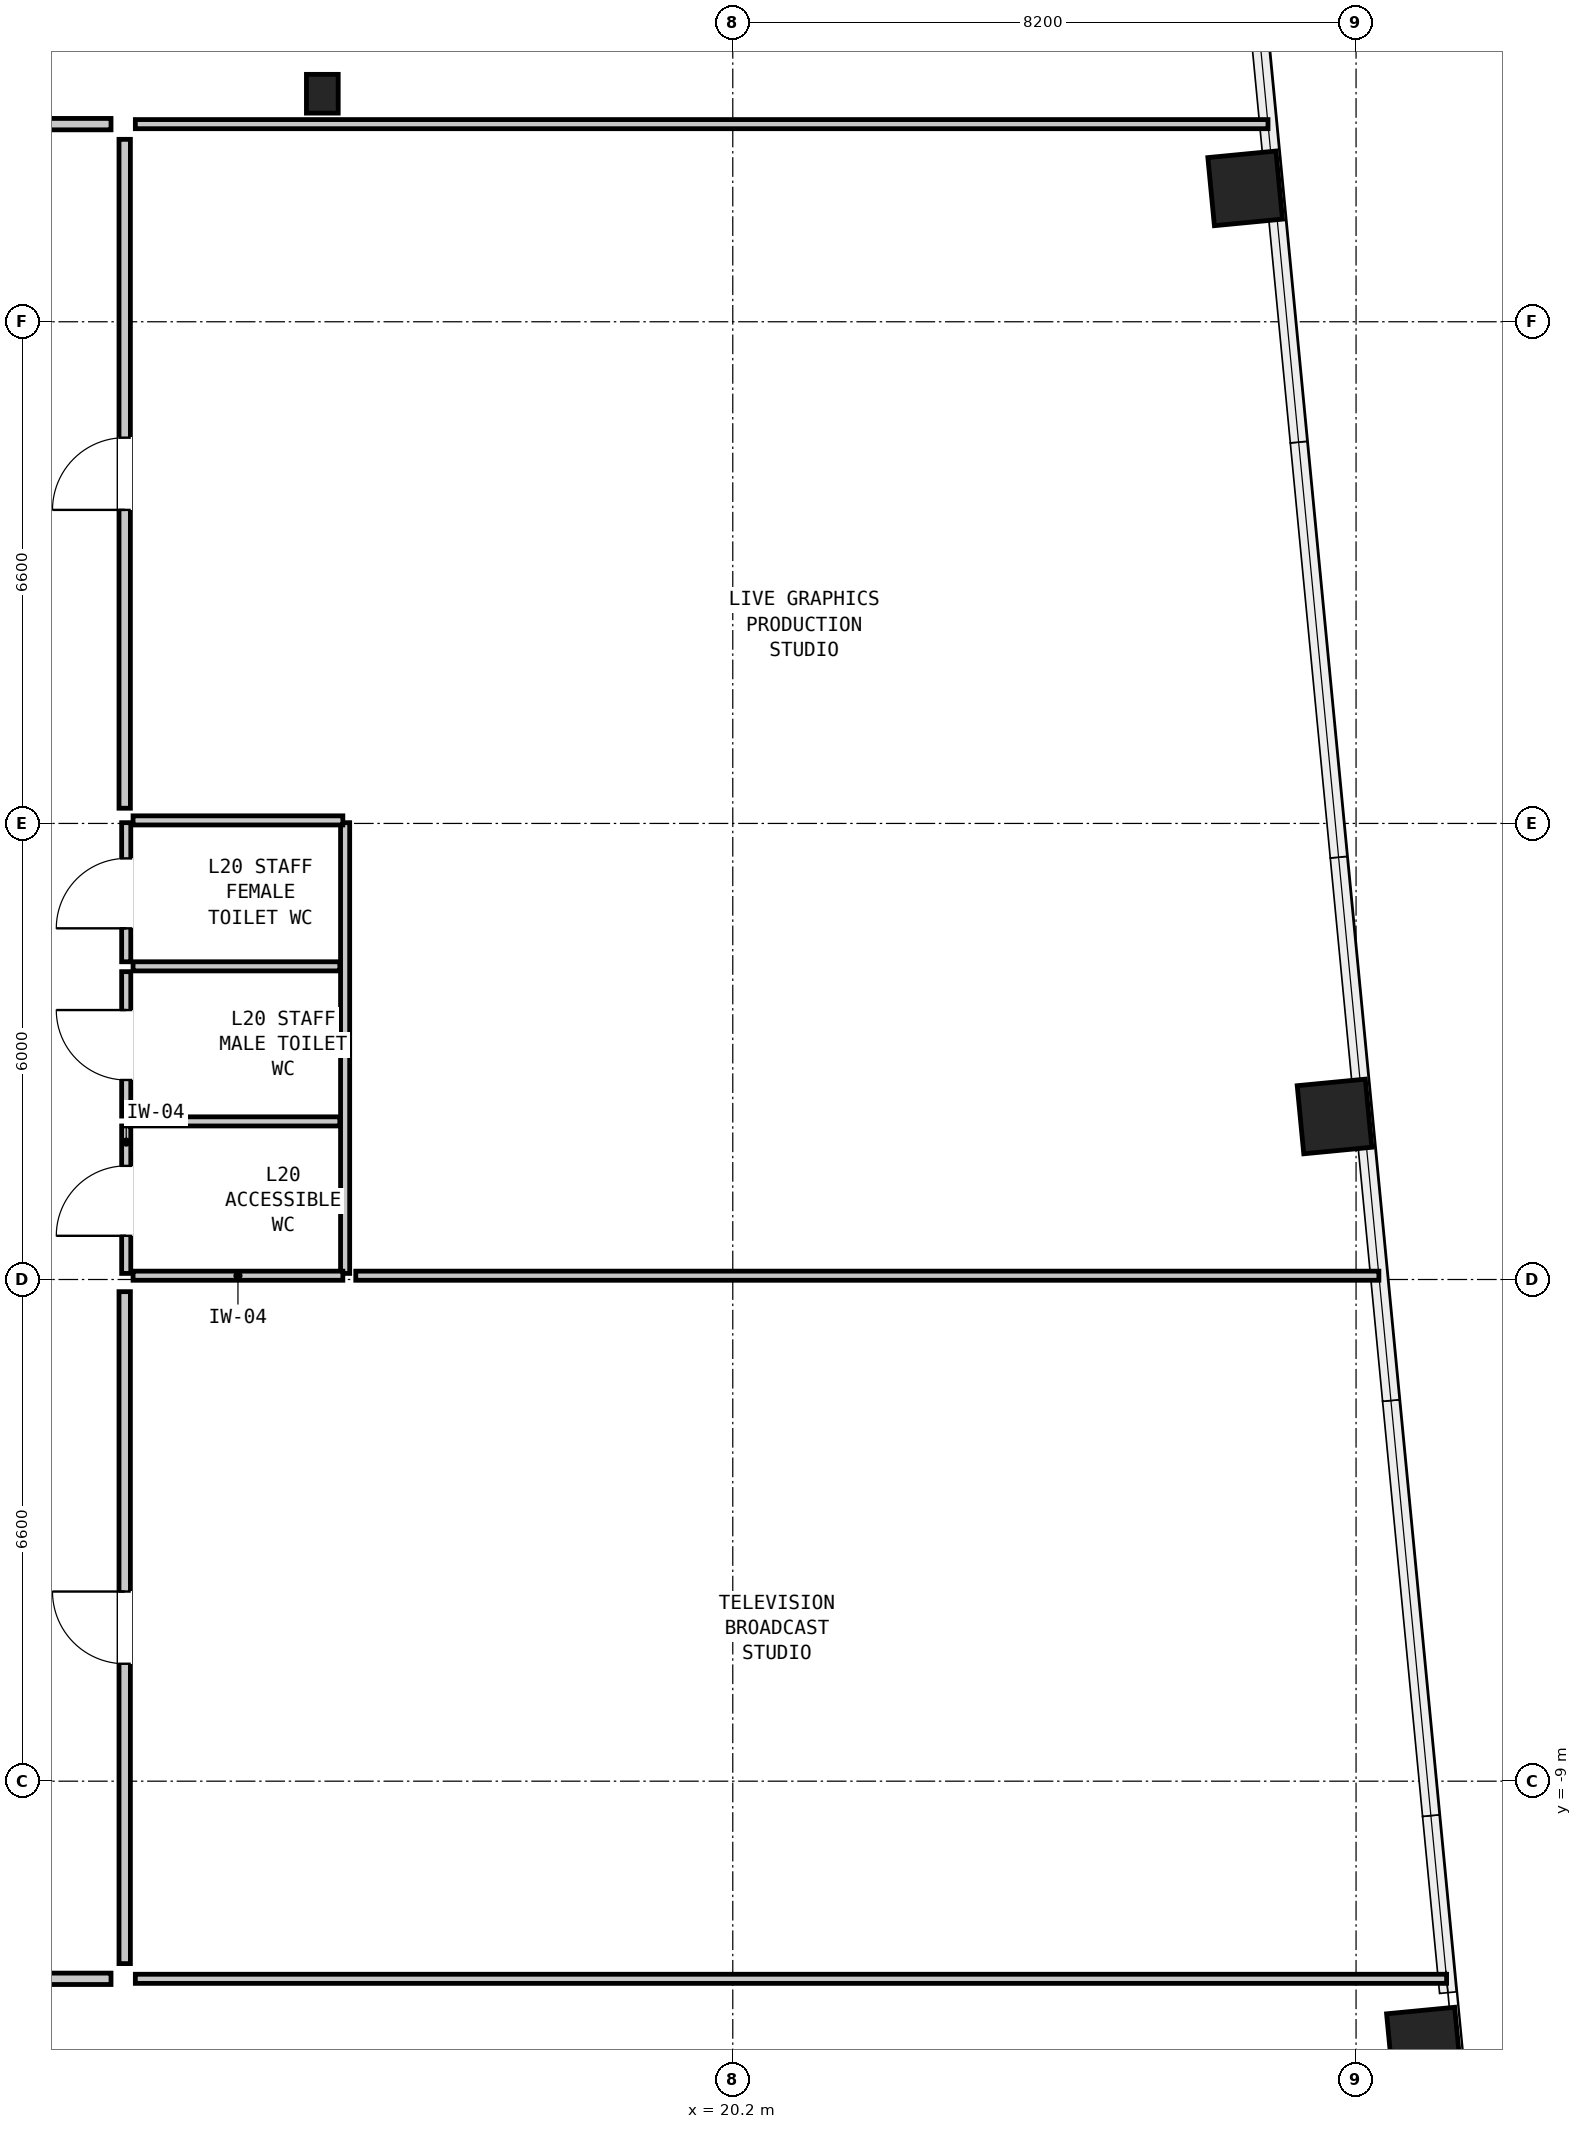
"""IFC4 building model, lengths in metres.
Left out: names, types, materials, properties, quantities, classifications, styles, units other than length and angle.
Written with IfcOpenShell. Run it as: python <this file> out.ifc"""

import sys

from ifc_helpers import new_model, si_unit, direction, frame, frame_2d, origin, origin_2d, place, context, subcontext, project, spatial, rectangle, hollow_rectangle, i_section, extrude, element, fill, save


model = new_model("IFC4")
c1 = context("Model", 3, precision=1e-05, world=origin(), true_north=direction((0.0, 1.0)))
c2 = subcontext(c1, "Body", "Model", "MODEL_VIEW")
j1 = project(units=[si_unit("LENGTHUNIT", "METRE"), si_unit("PLANEANGLEUNIT", "RADIAN")], contexts=[c1])
p1 = place(None, origin())
s1 = spatial("IfcSite", under=j1, at=p1, CompositionType="ELEMENT")
p2 = place(p1, origin())
s2 = spatial("IfcBuilding", under=s1, at=p2, CompositionType="ELEMENT")
p3 = place(p2, frame((0.0, 0.0, 72.5)))
s3 = spatial("IfcBuildingStorey", under=s2, at=p3, CompositionType="ELEMENT", Elevation=72.5)
for number, where, z_axis, x_axis in (
    (1, (29.292, -12.465, 0.0), (0.0, 0.0, 1.0), (-0.096, 0.995, 0.0)),
    (2, (28.117, -0.255, 0.0), (0.0, 0.0, 1.0), (-0.096, 0.995, 0.0)),
    (3, (26.941, 11.955, 0.0), (0.0, 0.0, 1.0), (-0.096, 0.995, 0.0)),
):
    element("IfcColumn", number, at=place(p3, frame(where, z_axis=z_axis, x_axis=x_axis)), inside=s3, PredefinedType="COLUMN", context=c2, shape_type="SweptSolid", body=[
        extrude(hollow_rectangle(XDim=0.9, YDim=0.9, WallThickness=0.055, at=origin_2d()), origin(), (0.0, 0.0, 1.0), 3.05),
    ])
p4 = place(p3, frame((14.8, 13.2, 0.0), z_axis=(0.0, 0.0, 1.0), x_axis=(1.0, 0.0, 0.0)))
e4 = element("IfcColumn", 4, at=p4, inside=s3, PredefinedType="COLUMN", context=c2, shape_type="SweptSolid", body=[
    extrude(i_section(OverallWidth=0.418, OverallDepth=0.51, WebThickness=0.042, FlangeThickness=0.068, at=origin_2d()), origin(), (0.0, 0.0, 1.0), 3.05),
])
p5 = place(p3, frame((12.22, -2.32, 0.0), z_axis=(0.0, 0.0, 1.0), x_axis=(0.0, 1.0, 0.0)))
e5 = element("IfcWall", 5, at=p5, inside=s3, PredefinedType="PARTITIONING", context=c2, shape_type="SweptSolid", body=[
    extrude(rectangle(XDim=1.94, YDim=0.12, at=frame_2d((0.97, 0.0))), origin(), (0.0, 0.0, 1.0), 2.83),
])
p6 = place(p5, frame((0.495, 0.0, 0.0)))
e6 = element("IfcOpeningElement", 6, at=p6, cuts=e5, PredefinedType="OPENING", context=c2, shape_type="SweptSolid", body=[
    extrude(rectangle(XDim=0.92, YDim=2.1, at=frame_2d((0.46, 1.05))), frame((0.0, 0.072, 0.0), z_axis=(0.0, -1.0, 0.0), x_axis=(1.0, 0.0, 0.0)), (0.0, 0.0, 1.0), 0.144),
])
p7 = place(p3, frame((12.22, -0.25, 0.0), z_axis=(0.0, 0.0, 1.0), x_axis=(0.0, 1.0, 0.0)))
e7 = element("IfcWall", 7, at=p7, inside=s3, PredefinedType="PARTITIONING", context=c2, shape_type="SweptSolid", body=[
    extrude(rectangle(XDim=1.9, YDim=0.12, at=frame_2d((0.95, 0.0))), origin(), (0.0, 0.0, 1.0), 2.83),
])
p8 = place(p7, frame((0.475, 0.0, 0.0)))
e8 = element("IfcOpeningElement", 8, at=p8, cuts=e7, PredefinedType="OPENING", context=c2, shape_type="SweptSolid", body=[
    extrude(rectangle(XDim=0.92, YDim=2.1, at=frame_2d((0.46, 1.05))), frame((0.0, 0.072, 0.0), z_axis=(0.0, -1.0, 0.0), x_axis=(1.0, 0.0, 0.0)), (0.0, 0.0, 1.0), 0.144),
])
p9 = place(p3, frame((12.22, 1.78, 0.0), z_axis=(0.0, 0.0, 1.0), x_axis=(0.0, 1.0, 0.0)))
e9 = element("IfcWall", 9, at=p9, inside=s3, PredefinedType="PARTITIONING", context=c2, shape_type="SweptSolid", body=[
    extrude(rectangle(XDim=1.83, YDim=0.12, at=frame_2d((0.915, 0.0))), origin(), (0.0, 0.0, 1.0), 2.83),
])
p10 = place(p9, frame((0.44, 0.0, 0.0)))
e10 = element("IfcOpeningElement", 10, at=p10, cuts=e9, PredefinedType="OPENING", context=c2, shape_type="SweptSolid", body=[
    extrude(rectangle(XDim=0.92, YDim=2.1, at=frame_2d((0.46, 1.05))), frame((0.0, 0.072, 0.0), z_axis=(0.0, -1.0, 0.0), x_axis=(1.0, 0.0, 0.0)), (0.0, 0.0, 1.0), 0.144),
])
p11 = place(p3, frame((15.1, -2.32, 0.0), z_axis=(0.0, 0.0, 1.0), x_axis=(0.0, 1.0, 0.0)))
e11 = element("IfcWall", 11, at=p11, inside=s3, PredefinedType="PARTITIONING", context=c2, shape_type="SweptSolid", body=[
    extrude(rectangle(XDim=5.93, YDim=0.12, at=frame_2d((2.965, 0.0))), origin(), (0.0, 0.0, 1.0), 2.83),
])
for number, where, z_axis, x_axis in (
    (12, (12.31, -2.35, 0.0), (0.0, 0.0, 1.0), (1.0, 0.0, 0.0)),
    (13, (12.31, 3.64, 0.0), (0.0, 0.0, 1.0), (1.0, 0.0, 0.0)),
):
    element("IfcWall", number, at=place(p3, frame(where, z_axis=z_axis, x_axis=x_axis)), inside=s3, PredefinedType="PARTITIONING", context=c2, shape_type="SweptSolid", body=[
        extrude(rectangle(XDim=2.76, YDim=0.12, at=frame_2d((1.38, 0.0))), origin(), (0.0, 0.0, 1.0), 1.799),
    ])
for number, where, z_axis, x_axis in (
    (14, (12.31, -0.32, 0.0), (0.0, 0.0, 1.0), (1.0, 0.0, 0.0)),
    (15, (12.31, 1.72, 0.0), (0.0, 0.0, 1.0), (1.0, 0.0, 0.0)),
):
    element("IfcWall", number, at=place(p3, frame(where, z_axis=z_axis, x_axis=x_axis)), inside=s3, PredefinedType="PARTITIONING", context=c2, shape_type="SweptSolid", body=[
        extrude(rectangle(XDim=2.72, YDim=0.12, at=frame_2d((1.36, 0.0))), origin(), (0.0, 0.0, 1.0), 2.83),
    ])
p12 = place(p3, frame((12.34, 12.8, 0.0), z_axis=(0.0, 0.0, 1.0), x_axis=(1.0, 0.0, 0.0)))
e16 = element("IfcWall", 16, at=p12, inside=s3, PredefinedType="PARTITIONING", context=c2, shape_type="SweptSolid", body=[
    extrude(rectangle(XDim=14.902, YDim=0.12, at=frame_2d((7.451, 0.0))), origin(), (0.0, 0.0, 1.0), 2.83),
])
p13 = place(p3, frame((12.34, -11.6, 0.0), z_axis=(0.0, 0.0, 1.0), x_axis=(1.0, 0.0, 0.0)))
e17 = element("IfcWall", 17, at=p13, inside=s3, PredefinedType="PARTITIONING", context=c2, shape_type="SweptSolid", body=[
    extrude(rectangle(XDim=17.251, YDim=0.12, at=frame_2d((8.625, 0.0))), origin(), (0.0, 0.0, 1.0), 2.274),
])
p14 = place(p3, frame((15.24, -2.35, 0.0), z_axis=(0.0, 0.0, 1.0), x_axis=(1.0, 0.0, 0.0)))
e18 = element("IfcWall", 18, at=p14, inside=s3, PredefinedType="PARTITIONING", context=c2, shape_type="SweptSolid", body=[
    extrude(rectangle(XDim=13.46, YDim=0.12, at=frame_2d((6.73, 0.0))), origin(), (0.0, 0.0, 1.0), 1.799),
])
p15 = place(p3, frame((-2.72, 12.8, 0.0), z_axis=(0.0, 0.0, 1.0), x_axis=(1.0, 0.0, 0.0)))
e19 = element("IfcWall", 19, at=p15, inside=s3, PredefinedType="PARTITIONING", context=c2, shape_type="SweptSolid", body=[
    extrude(rectangle(XDim=14.74, YDim=0.15, at=frame_2d((7.37, 0.0))), origin(), (0.0, 0.0, 1.0), 2.83),
])
p16 = place(p15, frame((6.895, 0.0, 0.0)))
e20 = element("IfcOpeningElement", 20, at=p16, cuts=e19, PredefinedType="OPENING", context=c2, shape_type="SweptSolid", body=[
    extrude(rectangle(XDim=0.95, YDim=2.1, at=frame_2d((0.475, 1.05))), frame((0.0, 0.087, 0.0), z_axis=(0.0, -1.0, 0.0), x_axis=(1.0, 0.0, 0.0)), (0.0, 0.0, 1.0), 0.174),
])
p17 = place(p3, frame((-12.02, -11.6, 0.0), z_axis=(0.0, 0.0, 1.0), x_axis=(1.0, 0.0, 0.0)))
e21 = element("IfcWall", 21, at=p17, inside=s3, PredefinedType="PARTITIONING", context=c2, shape_type="SweptSolid", body=[
    extrude(rectangle(XDim=24.04, YDim=0.15, at=frame_2d((12.02, 0.0))), origin(), (0.0, 0.0, 1.0), 2.274),
])
p18 = place(p17, frame((11.545, 0.0, 0.0)))
e22 = element("IfcOpeningElement", 22, at=p18, cuts=e21, PredefinedType="OPENING", context=c2, shape_type="SweptSolid", body=[
    extrude(rectangle(XDim=0.95, YDim=2.1, at=frame_2d((0.475, 1.05))), frame((0.0, 0.087, 0.0), z_axis=(0.0, -1.0, 0.0), x_axis=(1.0, 0.0, 0.0)), (0.0, 0.0, 1.0), 0.174),
])
p19 = place(p3, frame((12.2, -11.4, 0.0), z_axis=(0.0, 0.0, 1.0), x_axis=(0.0, 1.0, 0.0)))
e23 = element("IfcWall", 23, at=p19, inside=s3, PredefinedType="PARTITIONING", context=c2, shape_type="SweptSolid", body=[
    extrude(rectangle(XDim=8.84, YDim=0.15, at=frame_2d((4.42, 0.0))), origin(), (0.0, 0.0, 1.0), 2.83),
])
p20 = place(p19, frame((3.945, 0.0, 0.0)))
e24 = element("IfcOpeningElement", 24, at=p20, cuts=e23, PredefinedType="OPENING", context=c2, shape_type="SweptSolid", body=[
    extrude(rectangle(XDim=0.95, YDim=2.1, at=frame_2d((0.475, 1.05))), frame((0.0, 0.087, 0.0), z_axis=(0.0, -1.0, 0.0), x_axis=(1.0, 0.0, 0.0)), (0.0, 0.0, 1.0), 0.174),
])
p21 = place(p3, frame((12.2, 3.8, 0.0), z_axis=(0.0, 0.0, 1.0), x_axis=(0.0, 1.0, 0.0)))
e25 = element("IfcWall", 25, at=p21, inside=s3, PredefinedType="PARTITIONING", context=c2, shape_type="SweptSolid", body=[
    extrude(rectangle(XDim=8.8, YDim=0.15, at=frame_2d((4.4, 0.0))), origin(), (0.0, 0.0, 1.0), 2.83),
])
p22 = place(p21, frame((3.925, 0.0, 0.0)))
e26 = element("IfcOpeningElement", 26, at=p22, cuts=e25, PredefinedType="OPENING", context=c2, shape_type="SweptSolid", body=[
    extrude(rectangle(XDim=0.95, YDim=2.1, at=frame_2d((0.475, 1.05))), frame((0.0, 0.087, 0.0), z_axis=(0.0, -1.0, 0.0), x_axis=(1.0, 0.0, 0.0)), (0.0, 0.0, 1.0), 0.174),
])
p23 = place(p6, origin())
e27 = element("IfcDoor", 27, at=p23, inside=s3, OperationType="SINGLE_SWING_LEFT", PredefinedType="DOOR", context=c2, shape_type="SweptSolid", body=[
    extrude(rectangle(XDim=0.92, YDim=2.1, at=frame_2d((0.46, 1.05))), frame((0.0, 0.025, 0.0), z_axis=(0.0, -1.0, 0.0), x_axis=(1.0, 0.0, 0.0)), (0.0, 0.0, 1.0), 0.05),
])
fill(e6, e27)
p24 = place(p8, origin())
e28 = element("IfcDoor", 28, at=p24, inside=s3, OperationType="SINGLE_SWING_RIGHT", PredefinedType="DOOR", context=c2, shape_type="SweptSolid", body=[
    extrude(rectangle(XDim=0.92, YDim=2.1, at=frame_2d((0.46, 1.05))), frame((0.0, 0.025, 0.0), z_axis=(0.0, -1.0, 0.0), x_axis=(1.0, 0.0, 0.0)), (0.0, 0.0, 1.0), 0.05),
])
fill(e8, e28)
p25 = place(p10, origin())
e29 = element("IfcDoor", 29, at=p25, inside=s3, OperationType="SINGLE_SWING_LEFT", PredefinedType="DOOR", context=c2, shape_type="SweptSolid", body=[
    extrude(rectangle(XDim=0.92, YDim=2.1, at=frame_2d((0.46, 1.05))), frame((0.0, 0.025, 0.0), z_axis=(0.0, -1.0, 0.0), x_axis=(1.0, 0.0, 0.0)), (0.0, 0.0, 1.0), 0.05),
])
fill(e10, e29)
p26 = place(p20, origin())
e30 = element("IfcDoor", 30, at=p26, inside=s3, OperationType="SINGLE_SWING_RIGHT", PredefinedType="DOOR", context=c2, shape_type="SweptSolid", body=[
    extrude(rectangle(XDim=0.95, YDim=2.1, at=frame_2d((0.475, 1.05))), frame((0.0, 0.025, 0.0), z_axis=(0.0, -1.0, 0.0), x_axis=(1.0, 0.0, 0.0)), (0.0, 0.0, 1.0), 0.05),
])
fill(e24, e30)
p27 = place(p22, origin())
e31 = element("IfcDoor", 31, at=p27, inside=s3, OperationType="SINGLE_SWING_LEFT", PredefinedType="DOOR", context=c2, shape_type="SweptSolid", body=[
    extrude(rectangle(XDim=0.95, YDim=2.1, at=frame_2d((0.475, 1.05))), frame((0.0, 0.025, 0.0), z_axis=(0.0, -1.0, 0.0), x_axis=(1.0, 0.0, 0.0)), (0.0, 0.0, 1.0), 0.05),
])
fill(e26, e31)
save(model, sys.argv[1])
